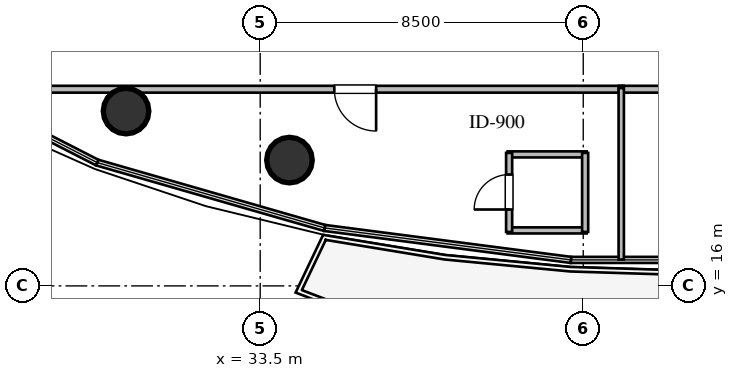
"""IFC4 building model, lengths in metres.
Left out: names, types, materials, properties, quantities, classifications, styles, units other than length and angle.
Written with IfcOpenShell. Run it as: python <this file> out.ifc"""

import sys

from ifc_helpers import new_model, si_unit, direction, frame, frame_2d, origin, origin_2d, place, context, subcontext, project, spatial, rectangle, circle, extrude, element, fill, save


model = new_model("IFC4")
c1 = context("Model", 3, precision=1e-05, world=origin(), true_north=direction((0.0, 1.0)))
c2 = subcontext(c1, "Body", "Model", "MODEL_VIEW")
j1 = project(units=[si_unit("LENGTHUNIT", "METRE"), si_unit("PLANEANGLEUNIT", "RADIAN")], contexts=[c1])
p1 = place(None, origin())
s1 = spatial("IfcSite", under=j1, at=p1, CompositionType="ELEMENT")
p2 = place(p1, origin())
s2 = spatial("IfcBuilding", under=s1, at=p2, CompositionType="ELEMENT")
p3 = place(p2, frame((0.0, 0.0, 117.0)))
s3 = spatial("IfcBuildingStorey", under=s2, at=p3, CompositionType="ELEMENT", Elevation=117.0)
for number, where, z_axis, x_axis in (
    (1, (29.97, 20.6, 0.0), (0.0, 0.0, 1.0), (1.0, 0.0, 0.0)),
    (2, (34.27, 19.31, 0.0), (0.0, 0.0, 1.0), (1.0, 0.0, 0.0)),
):
    element("IfcColumn", number, at=place(p3, frame(where, z_axis=z_axis, x_axis=x_axis)), inside=s3, PredefinedType="COLUMN", context=c2, shape_type="SweptSolid", body=[
        extrude(circle(Radius=0.6, at=origin_2d()), origin(), (0.0, 0.0, 1.0), 3.6),
    ])
for number, where, z_axis, x_axis in (
    (3, (40.01, 17.46, 0.0), (0.0, 0.0, 1.0), (1.0, 0.0, 0.0)),
    (4, (40.01, 19.46, 0.0), (0.0, 0.0, 1.0), (1.0, 0.0, 0.0)),
):
    element("IfcWall", number, at=place(p3, frame(where, z_axis=z_axis, x_axis=x_axis)), inside=s3, PredefinedType="PLUMBINGWALL", context=c2, shape_type="SweptSolid", body=[
        extrude(rectangle(XDim=2.08, YDim=0.16, at=frame_2d((1.04, 0.0))), origin(), (0.0, 0.0, 1.0), 3.36),
    ])
p4 = place(p3, frame((40.05, 17.42, 0.0), z_axis=(0.0, 0.0, 1.0), x_axis=(0.0, 1.0, 0.0)))
e5 = element("IfcWall", 5, at=p4, inside=s3, PredefinedType="PLUMBINGWALL", context=c2, shape_type="SweptSolid", body=[
    extrude(rectangle(XDim=2.08, YDim=0.16, at=frame_2d((1.04, 0.0))), origin(), (0.0, 0.0, 1.0), 3.36),
])
p5 = place(p4, frame((0.59, 0.0, 0.0)))
e6 = element("IfcOpeningElement", 6, at=p5, cuts=e5, PredefinedType="OPENING", context=c2, shape_type="SweptSolid", body=[
    extrude(rectangle(XDim=0.92, YDim=2.1, at=frame_2d((0.46, 1.05))), frame((0.0, 0.09, 0.0), z_axis=(0.0, -1.0, 0.0), x_axis=(1.0, 0.0, 0.0)), (0.0, 0.0, 1.0), 0.18),
])
p6 = place(p3, frame((42.05, 17.42, 0.0), z_axis=(0.0, 0.0, 1.0), x_axis=(0.0, 1.0, 0.0)))
e7 = element("IfcWall", 7, at=p6, inside=s3, PredefinedType="PLUMBINGWALL", context=c2, shape_type="SweptSolid", body=[
    extrude(rectangle(XDim=2.08, YDim=0.16, at=frame_2d((1.04, 0.0))), origin(), (0.0, 0.0, 1.0), 3.36),
])
p7 = place(p3, frame((43.065, 21.175, 0.0), z_axis=(0.0, 0.0, 1.0), x_axis=(-1.0, 0.0, 0.0)))
e8 = element("IfcWall", 8, at=p7, inside=s3, PredefinedType="PARTITIONING", context=c2, shape_type="SweptSolid", body=[
    extrude(rectangle(XDim=17.614, YDim=0.18, at=frame_2d((8.807, 0.0))), origin(), (0.0, 0.0, 1.0), 2.657),
])
p8 = place(p7, frame((6.515, 0.0, 0.0)))
e9 = element("IfcOpeningElement", 9, at=p8, cuts=e8, PredefinedType="OPENING", context=c2, shape_type="SweptSolid", body=[
    extrude(rectangle(XDim=1.1, YDim=2.1, at=frame_2d((0.55, 1.05))), frame((0.0, 0.1, 0.0), z_axis=(0.0, -1.0, 0.0), x_axis=(1.0, 0.0, 0.0)), (0.0, 0.0, 1.0), 0.2),
])
p9 = place(p3, frame((46.455, 21.175, 0.0), z_axis=(0.0, 0.0, 1.0), x_axis=(-1.0, 0.0, 0.0)))
e10 = element("IfcWall", 10, at=p9, inside=s3, PredefinedType="PARTITIONING", context=c2, shape_type="SweptSolid", body=[
    extrude(rectangle(XDim=3.52, YDim=0.18, at=frame_2d((1.76, 0.0))), origin(), (0.0, 0.0, 1.0), 2.996),
])
p10 = place(p9, frame((1.21, 0.0, 0.0)))
e11 = element("IfcOpeningElement", 11, at=p10, cuts=e10, PredefinedType="OPENING", context=c2, shape_type="SweptSolid", body=[
    extrude(rectangle(XDim=1.1, YDim=2.1, at=frame_2d((0.55, 1.05))), frame((0.0, 0.1, 0.0), z_axis=(0.0, -1.0, 0.0), x_axis=(1.0, 0.0, 0.0)), (0.0, 0.0, 1.0), 0.2),
])
p11 = place(p3, frame((43.0, 21.205, 0.0), z_axis=(0.0, 0.0, 1.0), x_axis=(0.0, -1.0, 0.0)))
e12 = element("IfcWall", 12, at=p11, inside=s3, PredefinedType="PARTITIONING", context=c2, shape_type="SweptSolid", body=[
    extrude(rectangle(XDim=4.511, YDim=0.14, at=frame_2d((2.255, 0.0))), origin(), (0.0, 0.0, 1.0), 3.36),
])
p12 = place(p5, origin())
e13 = element("IfcDoor", 13, at=p12, inside=s3, OperationType="SINGLE_SWING_LEFT", PredefinedType="DOOR", context=c2, shape_type="SweptSolid", body=[
    extrude(rectangle(XDim=0.92, YDim=2.1, at=frame_2d((0.46, 1.05))), frame((0.0, 0.025, 0.0), z_axis=(0.0, -1.0, 0.0), x_axis=(1.0, 0.0, 0.0)), (0.0, 0.0, 1.0), 0.05),
])
fill(e6, e13)
p13 = place(p8, origin())
e14 = element("IfcDoor", 14, at=p13, inside=s3, OperationType="SINGLE_SWING_LEFT", PredefinedType="DOOR", context=c2, shape_type="SweptSolid", body=[
    extrude(rectangle(XDim=1.1, YDim=2.1, at=frame_2d((0.55, 1.05))), frame((0.0, 0.025, 0.0), z_axis=(0.0, -1.0, 0.0), x_axis=(1.0, 0.0, 0.0)), (0.0, 0.0, 1.0), 0.05),
])
fill(e9, e14)
save(model, sys.argv[1])
